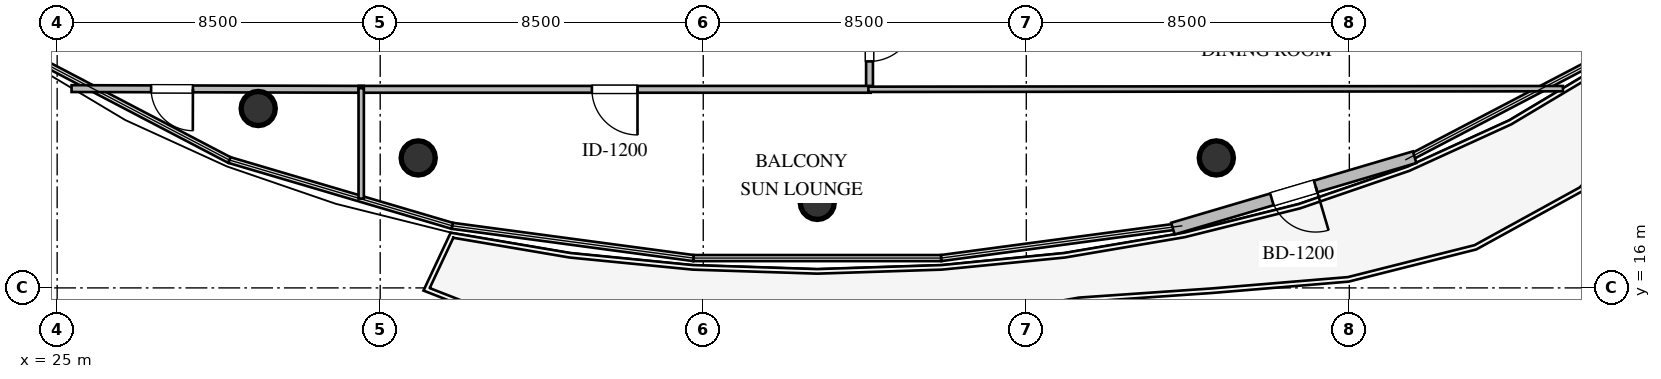
"""IFC4 building model, lengths in metres.
Left out: names, types, materials, properties, quantities, classifications, styles, units other than length and angle.
Written with IfcOpenShell. Run it as: python <this file> out.ifc"""

import sys

from ifc_helpers import new_model, si_unit, direction, frame, frame_2d, origin, origin_2d, place, context, subcontext, project, spatial, rectangle, circle, extrude, element, fill, save


model = new_model("IFC4")
c1 = context("Model", 3, precision=1e-05, world=origin(), true_north=direction((0.0, 1.0)))
c2 = subcontext(c1, "Body", "Model", "MODEL_VIEW")
j1 = project(units=[si_unit("LENGTHUNIT", "METRE"), si_unit("PLANEANGLEUNIT", "RADIAN")], contexts=[c1])
p1 = place(None, origin())
s1 = spatial("IfcSite", under=j1, at=p1, CompositionType="ELEMENT")
p2 = place(p1, origin())
s2 = spatial("IfcBuilding", under=s1, at=p2, CompositionType="ELEMENT")
p3 = place(p2, frame((0.0, 0.0, 285.2)))
s3 = spatial("IfcBuildingStorey", under=s2, at=p3, CompositionType="ELEMENT", Elevation=285.2)
for number, where, z_axis, x_axis in (
    (1, (30.29, 20.72, 0.0), (0.0, 0.0, 1.0), (1.0, 0.0, 0.0)),
    (2, (34.5, 19.42, 0.0), (0.0, 0.0, 1.0), (1.0, 0.0, 0.0)),
    (3, (45.0, 18.25, 0.0), (0.0, 0.0, 1.0), (1.0, 0.0, 0.0)),
    (4, (55.5, 19.42, 0.0), (0.0, 0.0, 1.0), (1.0, 0.0, 0.0)),
):
    element("IfcColumn", number, at=place(p3, frame(where, z_axis=z_axis, x_axis=x_axis)), inside=s3, PredefinedType="COLUMN", context=c2, shape_type="SweptSolid", body=[
        extrude(circle(Radius=0.45, at=origin_2d()), origin(), (0.0, 0.0, 1.0), 3.8),
    ])
p4 = place(p3, frame((60.718, 19.439, 0.0), z_axis=(0.0, 0.0, 1.0), x_axis=(-0.959026574291, -0.283316130503, 0.0)))
e5 = element("IfcWall", 5, at=p4, inside=s3, PredefinedType="STANDARD", context=c2, shape_type="SweptSolid", body=[
    extrude(rectangle(XDim=6.632, YDim=0.32, at=frame_2d((3.316, 0.0))), origin(), (0.0, 0.0, 1.0), 3.56),
])
p5 = place(p4, frame((2.716, 0.0, 0.0)))
e6 = element("IfcOpeningElement", 6, at=p5, cuts=e5, PredefinedType="OPENING", context=c2, shape_type="SweptSolid", body=[
    extrude(rectangle(XDim=1.2, YDim=2.15, at=frame_2d((0.6, 1.075))), frame((0.0, 0.17, 0.0), z_axis=(0.0, -1.0, 0.0), x_axis=(1.0, 0.0, 0.0)), (0.0, 0.0, 1.0), 0.34),
])
p6 = place(p3, frame((46.375, 23.925, 0.0), z_axis=(0.0, 0.0, 1.0), x_axis=(0.0, -1.0, 0.0)))
e7 = element("IfcWall", 7, at=p6, inside=s3, PredefinedType="PARTITIONING", context=c2, shape_type="SweptSolid", body=[
    extrude(rectangle(XDim=2.73, YDim=0.18, at=frame_2d((1.365, 0.0))), origin(), (0.0, 0.0, 1.0), 3.56),
])
p7 = place(p6, frame((0.765, 0.0, 0.0)))
e8 = element("IfcOpeningElement", 8, at=p7, cuts=e7, PredefinedType="OPENING", context=c2, shape_type="SweptSolid", body=[
    extrude(rectangle(XDim=1.2, YDim=2.15, at=frame_2d((0.6, 1.075))), frame((0.0, 0.1, 0.0), z_axis=(0.0, -1.0, 0.0), x_axis=(1.0, 0.0, 0.0)), (0.0, 0.0, 1.0), 0.2),
])
p8 = place(p3, frame((33.065, 21.225, 0.0), z_axis=(0.0, 0.0, 1.0), x_axis=(-0.999997008942, 0.002445834753, 0.0)))
e9 = element("IfcWall", 9, at=p8, inside=s3, PredefinedType="PARTITIONING", context=c2, shape_type="SweptSolid", body=[
    extrude(rectangle(XDim=7.686, YDim=0.18, at=frame_2d((3.843, 0.0))), origin(), (0.0, 0.0, 1.0), 3.017),
])
p9 = place(p8, frame((4.493, 0.0, 0.0)))
e10 = element("IfcOpeningElement", 10, at=p9, cuts=e9, PredefinedType="OPENING", context=c2, shape_type="SweptSolid", body=[
    extrude(rectangle(XDim=1.1, YDim=2.1, at=frame_2d((0.55, 1.05))), frame((0.0, 0.1, 0.0), z_axis=(0.0, -1.0, 0.0), x_axis=(1.0, 0.0, 0.0)), (0.0, 0.0, 1.0), 0.2),
])
p10 = place(p3, frame((46.405, 21.225, 0.0), z_axis=(0.0, 0.0, 1.0), x_axis=(-1.0, 0.0, 0.0)))
e11 = element("IfcWall", 11, at=p10, inside=s3, PredefinedType="PARTITIONING", context=c2, shape_type="SweptSolid", body=[
    extrude(rectangle(XDim=13.47, YDim=0.18, at=frame_2d((6.735, 0.0))), origin(), (0.0, 0.0, 1.0), 3.196),
])
p11 = place(p10, frame((6.135, 0.0, 0.0)))
e12 = element("IfcOpeningElement", 12, at=p11, cuts=e11, PredefinedType="OPENING", context=c2, shape_type="SweptSolid", body=[
    extrude(rectangle(XDim=1.2, YDim=2.15, at=frame_2d((0.6, 1.075))), frame((0.0, 0.1, 0.0), z_axis=(0.0, -1.0, 0.0), x_axis=(1.0, 0.0, 0.0)), (0.0, 0.0, 1.0), 0.2),
])
p12 = place(p3, frame((64.621, 21.243, 0.0), z_axis=(0.0, 0.0, 1.0), x_axis=(-0.999999524525, -0.000975166183, 0.0)))
e13 = element("IfcWall", 13, at=p12, inside=s3, PredefinedType="PARTITIONING", context=c2, shape_type="SweptSolid", body=[
    extrude(rectangle(XDim=18.276, YDim=0.14, at=frame_2d((9.138, 0.0))), origin(), (0.0, 0.0, 1.0), 3.196),
])
p13 = place(p3, frame((33.0, 21.255, 0.0), z_axis=(0.0, 0.0, 1.0), x_axis=(0.0, -1.0, 0.0)))
e14 = element("IfcWall", 14, at=p13, inside=s3, PredefinedType="PARTITIONING", context=c2, shape_type="SweptSolid", body=[
    extrude(rectangle(XDim=2.904, YDim=0.14, at=frame_2d((1.452, 0.0))), origin(), (0.0, 0.0, 1.0), 3.56),
])
p14 = place(p5, origin())
e15 = element("IfcDoor", 15, at=p14, inside=s3, OperationType="SINGLE_SWING_LEFT", PredefinedType="DOOR", context=c2, shape_type="SweptSolid", body=[
    extrude(rectangle(XDim=1.2, YDim=2.15, at=frame_2d((0.6, 1.075))), frame((0.0, 0.025, 0.0), z_axis=(0.0, -1.0, 0.0), x_axis=(1.0, 0.0, 0.0)), (0.0, 0.0, 1.0), 0.05),
])
fill(e6, e15)
p15 = place(p7, origin())
e16 = element("IfcDoor", 16, at=p15, inside=s3, OperationType="SINGLE_SWING_LEFT", PredefinedType="DOOR", context=c2, shape_type="SweptSolid", body=[
    extrude(rectangle(XDim=1.2, YDim=2.15, at=frame_2d((0.6, 1.075))), frame((0.0, 0.025, 0.0), z_axis=(0.0, -1.0, 0.0), x_axis=(1.0, 0.0, 0.0)), (0.0, 0.0, 1.0), 0.05),
])
fill(e8, e16)
p16 = place(p9, origin())
e17 = element("IfcDoor", 17, at=p16, inside=s3, OperationType="SINGLE_SWING_LEFT", PredefinedType="DOOR", context=c2, shape_type="SweptSolid", body=[
    extrude(rectangle(XDim=1.1, YDim=2.1, at=frame_2d((0.55, 1.05))), frame((0.0, 0.025, 0.0), z_axis=(0.0, -1.0, 0.0), x_axis=(1.0, 0.0, 0.0)), (0.0, 0.0, 1.0), 0.05),
])
fill(e10, e17)
p17 = place(p11, origin())
e18 = element("IfcDoor", 18, at=p17, inside=s3, OperationType="SINGLE_SWING_LEFT", PredefinedType="DOOR", context=c2, shape_type="SweptSolid", body=[
    extrude(rectangle(XDim=1.2, YDim=2.15, at=frame_2d((0.6, 1.075))), frame((0.0, 0.025, 0.0), z_axis=(0.0, -1.0, 0.0), x_axis=(1.0, 0.0, 0.0)), (0.0, 0.0, 1.0), 0.05),
])
fill(e12, e18)
save(model, sys.argv[1])
